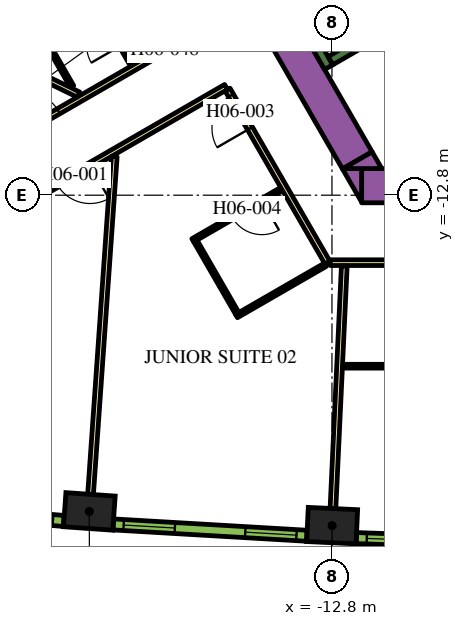
"""IFC4 building model, lengths in metres.
Left out: names, types, materials, properties, quantities, classifications, styles, units other than length and angle.
Written with IfcOpenShell. Run it as: python <this file> out.ifc"""

import sys

from ifc_helpers import new_model, si_unit, direction, frame, frame_2d, origin, origin_2d, place, context, subcontext, project, spatial, polyline, rectangle, outline, extrude, element, fill, save


model = new_model("IFC4")
c1 = context("Model", 3, precision=1e-05, world=origin(), true_north=direction((0.0, 1.0)))
c2 = subcontext(c1, "Body", "Model", "MODEL_VIEW")
j1 = project(units=[si_unit("LENGTHUNIT", "METRE"), si_unit("PLANEANGLEUNIT", "RADIAN")], contexts=[c1])
p1 = place(None, origin())
s1 = spatial("IfcSite", under=j1, at=p1, CompositionType="ELEMENT")
p2 = place(p1, origin())
s2 = spatial("IfcBuilding", under=s1, at=p2, CompositionType="ELEMENT")
p3 = place(p2, frame((0.0, 0.0, 87.6)))
s3 = spatial("IfcBuildingStorey", under=s2, at=p3, CompositionType="ELEMENT", Elevation=87.6)
for number, where, z_axis, x_axis in (
    (1, (-19.184, -21.12, 0.0), (0.0, 0.0, 1.0), (0.998, -0.07, 0.0)),
    (2, (-12.795, -21.494, 0.0), (0.0, 0.0, 1.0), (0.999, -0.047, 0.0)),
):
    element("IfcColumn", number, at=place(p3, frame(where, z_axis=z_axis, x_axis=x_axis)), inside=s3, PredefinedType="COLUMN", context=c2, shape_type="SweptSolid", body=[
        extrude(rectangle(XDim=1.3, YDim=0.9, at=origin_2d()), origin(), (0.0, 0.0, 1.0), 3.9),
    ])
p4 = place(p3, frame((-12.019, -12.55, 0.0), z_axis=(0.0, 0.0, 1.0), x_axis=(1.0, 0.0, 0.0)))
e3 = element("IfcWall", 3, at=p4, inside=s3, PredefinedType="SOLIDWALL", context=c2, shape_type="SweptSolid", body=[
    extrude(rectangle(XDim=21.63, YDim=0.9, at=frame_2d((10.815, 0.0))), origin(), (0.0, 0.0, 1.0), 3.9),
])
p5 = place(p3, origin())
e4 = element("IfcWall", 4, at=p5, inside=s3, PredefinedType="SOLIDWALL", context=c2, shape_type="SweptSolid", body=[
    extrude(outline(polyline([(-12.529, -12.1), (-12.021, -12.1), (-12.021, -12.98), (-12.529, -12.1)])), origin(), (0.0, 0.0, 1.0), 3.9),
])
p6 = place(p3, frame((-12.134, -11.883, 0.0), z_axis=(0.0, 0.0, 1.0), x_axis=(-0.500005339912, 0.866022320763, 0.0)))
e5 = element("IfcWall", 5, at=p6, inside=s3, PredefinedType="SOLIDWALL", context=c2, shape_type="SweptSolid", body=[
    extrude(rectangle(XDim=9.488, YDim=0.9, at=frame_2d((4.744, 0.0))), origin(), (0.0, 0.0, 1.0), 3.9),
])
e6 = element("IfcWall", 6, at=p5, inside=s3, PredefinedType="SOLIDWALL", context=c2, shape_type="SweptSolid", body=[
    extrude(outline(polyline([(-11.489, -12.1), (-12.505, -12.1), (-11.743, -11.66), (-11.489, -12.1)])), origin(), (0.0, 0.0, 1.0), 3.9),
])
p7 = place(p3, frame((-12.885, -9.431, 0.0), z_axis=(0.0, 0.0, 1.0), x_axis=(-0.500020560727, 0.866013532718, 0.0)))
e7 = element("IfcWall", 7, at=p7, inside=s3, PredefinedType="SOLIDWALL", context=c2, shape_type="SweptSolid", body=[
    extrude(rectangle(XDim=3.45, YDim=0.25, at=frame_2d((1.725, 0.0))), origin(), (0.0, 0.0, 1.0), 3.9),
])
p8 = place(p3, frame((-12.84, -9.261, 0.0), z_axis=(0.0, 0.0, 1.0), x_axis=(0.866016039709, 0.500016218704, 0.0)))
e8 = element("IfcWall", 8, at=p8, inside=s3, PredefinedType="SOLIDWALL", context=c2, shape_type="SweptSolid", body=[
    extrude(rectangle(XDim=7.05, YDim=0.25, at=frame_2d((3.525, 0.0))), origin(), (0.0, 0.0, 1.0), 3.9),
])
p9 = place(p3, frame((-28.211, -15.335, 0.0), z_axis=(0.0, 0.0, 1.0), x_axis=(0.866025884867, 0.49999916674, 0.0)))
e9 = element("IfcWall", 9, at=p9, inside=s3, PredefinedType="PARTITIONING", context=c2, shape_type="SweptSolid", body=[
    extrude(rectangle(XDim=13.543, YDim=0.15, at=frame_2d((6.772, 0.0))), origin(), (0.0, 0.0, 1.0), 2.75),
])
p10 = place(p9, frame((12.214, 0.0, 0.0)))
e10 = element("IfcOpeningElement", 10, at=p10, cuts=e9, PredefinedType="OPENING", context=c2, shape_type="SweptSolid", body=[
    extrude(rectangle(XDim=1.0, YDim=2.1, at=frame_2d((0.5, 1.05))), frame((0.0, 0.085, 0.0), z_axis=(0.0, -1.0, 0.0), x_axis=(1.0, 0.0, 0.0)), (0.0, 0.0, 1.0), 0.17),
])
p11 = place(p9, frame((8.488, 0.0, 0.0)))
e11 = element("IfcOpeningElement", 11, at=p11, cuts=e9, PredefinedType="OPENING", context=c2, shape_type="SweptSolid", body=[
    extrude(rectangle(XDim=1.0, YDim=2.1, at=frame_2d((0.5, 1.05))), frame((0.0, 0.085, 0.0), z_axis=(0.0, -1.0, 0.0), x_axis=(1.0, 0.0, 0.0)), (0.0, 0.0, 1.0), 0.17),
])
p12 = place(p3, frame((-15.587, -9.952, 0.0), z_axis=(0.0, 0.0, 1.0), x_axis=(-0.866017869832, -0.500013048961, 0.0)))
e12 = element("IfcWall", 12, at=p12, inside=s3, PredefinedType="PARTITIONING", context=c2, shape_type="SweptSolid", body=[
    extrude(rectangle(XDim=13.624, YDim=0.15, at=frame_2d((6.812, 0.0))), origin(), (0.0, 0.0, 1.0), 2.75),
])
p13 = place(p12, frame((4.134, 0.0, 0.0)))
e13 = element("IfcOpeningElement", 13, at=p13, cuts=e12, PredefinedType="OPENING", context=c2, shape_type="SweptSolid", body=[
    extrude(rectangle(XDim=1.0, YDim=2.1, at=frame_2d((0.5, 1.05))), frame((0.0, 0.085, 0.0), z_axis=(0.0, -1.0, 0.0), x_axis=(1.0, 0.0, 0.0)), (0.0, 0.0, 1.0), 0.17),
])
p14 = place(p3, frame((-12.918, -14.575, 0.0), z_axis=(0.0, 0.0, 1.0), x_axis=(-0.500009150678, 0.866020120573, 0.0)))
e14 = element("IfcWall", 14, at=p14, inside=s3, PredefinedType="PARTITIONING", context=c2, shape_type="SweptSolid", body=[
    extrude(rectangle(XDim=5.258, YDim=0.15, at=frame_2d((2.629, 0.0))), origin(), (0.0, 0.0, 1.0), 2.75),
])
p15 = place(p14, frame((4.078, 0.0, 0.0)))
e15 = element("IfcOpeningElement", 15, at=p15, cuts=e14, PredefinedType="OPENING", context=c2, shape_type="SweptSolid", body=[
    extrude(rectangle(XDim=1.0, YDim=2.1, at=frame_2d((0.5, 1.05))), frame((0.0, 0.085, 0.0), z_axis=(0.0, -1.0, 0.0), x_axis=(1.0, 0.0, 0.0)), (0.0, 0.0, 1.0), 0.17),
])
p16 = place(p3, frame((12.918, -14.575, 0.0), z_axis=(0.0, 0.0, 1.0), x_axis=(-1.0, 0.0, 0.0)))
e16 = element("IfcWall", 16, at=p16, inside=s3, PredefinedType="PARTITIONING", context=c2, shape_type="SweptSolid", body=[
    extrude(rectangle(XDim=25.766, YDim=0.15, at=frame_2d((12.883, 0.0))), origin(), (0.0, 0.0, 1.0), 2.75),
])
p17 = place(p16, frame((19.306, 0.0, 0.0)))
e17 = element("IfcOpeningElement", 17, at=p17, cuts=e16, PredefinedType="OPENING", context=c2, shape_type="SweptSolid", body=[
    extrude(rectangle(XDim=1.0, YDim=2.1, at=frame_2d((0.5, 1.05))), frame((0.0, 0.085, 0.0), z_axis=(0.0, -1.0, 0.0), x_axis=(1.0, 0.0, 0.0)), (0.0, 0.0, 1.0), 0.17),
])
p18 = place(p16, frame((17.999, 0.0, 0.0)))
e18 = element("IfcOpeningElement", 18, at=p18, cuts=e16, PredefinedType="OPENING", context=c2, shape_type="SweptSolid", body=[
    extrude(rectangle(XDim=1.0, YDim=2.1, at=frame_2d((0.5, 1.05))), frame((0.0, 0.085, 0.0), z_axis=(0.0, -1.0, 0.0), x_axis=(1.0, 0.0, 0.0)), (0.0, 0.0, 1.0), 0.17),
])
p19 = place(p16, frame((10.874, 0.0, 0.0)))
e19 = element("IfcOpeningElement", 19, at=p19, cuts=e16, PredefinedType="OPENING", context=c2, shape_type="SweptSolid", body=[
    extrude(rectangle(XDim=0.9, YDim=2.1, at=frame_2d((0.45, 1.05))), frame((0.0, 0.085, 0.0), z_axis=(0.0, -1.0, 0.0), x_axis=(1.0, 0.0, 0.0)), (0.0, 0.0, 1.0), 0.17),
])
p20 = place(p16, frame((8.647, 0.0, 0.0)))
e20 = element("IfcOpeningElement", 20, at=p20, cuts=e16, PredefinedType="OPENING", context=c2, shape_type="SweptSolid", body=[
    extrude(rectangle(XDim=1.0, YDim=2.1, at=frame_2d((0.5, 1.05))), frame((0.0, 0.085, 0.0), z_axis=(0.0, -1.0, 0.0), x_axis=(1.0, 0.0, 0.0)), (0.0, 0.0, 1.0), 0.17),
])
p21 = place(p16, frame((0.18, 0.0, 0.0)))
e21 = element("IfcOpeningElement", 21, at=p21, cuts=e16, PredefinedType="OPENING", context=c2, shape_type="SweptSolid", body=[
    extrude(rectangle(XDim=1.0, YDim=2.1, at=frame_2d((0.5, 1.05))), frame((0.0, 0.085, 0.0), z_axis=(0.0, -1.0, 0.0), x_axis=(1.0, 0.0, 0.0)), (0.0, 0.0, 1.0), 0.17),
])
p22 = place(p3, frame((-27.479, -6.251, 0.0), z_axis=(0.0, 0.0, 1.0), x_axis=(0.898945877276, -0.438059710231, 0.0)))
e22 = element("IfcWall", 22, at=p22, inside=s3, PredefinedType="PARTITIONING", context=c2, shape_type="SweptSolid", body=[
    extrude(rectangle(XDim=8.909, YDim=0.15, at=frame_2d((4.455, 0.0))), origin(), (0.0, 0.0, 1.0), 2.75),
])
p23 = place(p3, frame((-19.153, -20.671, 0.0), z_axis=(0.0, 0.0, 1.0), x_axis=(0.070070736723, 0.997542025107, 0.0)))
e23 = element("IfcWall", 23, at=p23, inside=s3, PredefinedType="PARTITIONING", context=c2, shape_type="SweptSolid", body=[
    extrude(rectangle(XDim=8.909, YDim=0.15, at=frame_2d((4.455, 0.0))), origin(), (0.0, 0.0, 1.0), 2.75),
])
p24 = place(p3, frame((-12.774, -21.045, 0.0), z_axis=(0.0, 0.0, 1.0), x_axis=(0.046750341626, 0.998906605023, 0.0)))
e24 = element("IfcWall", 24, at=p24, inside=s3, PredefinedType="PARTITIONING", context=c2, shape_type="SweptSolid", body=[
    extrude(rectangle(XDim=6.392, YDim=0.15, at=frame_2d((3.196, 0.0))), origin(), (0.0, 0.0, 1.0), 2.75),
])
p25 = place(p3, frame((-14.123, -12.638, 0.0), z_axis=(0.0, 0.0, 1.0), x_axis=(-0.86599734893, -0.500048589285, 0.0)))
e25 = element("IfcWall", 25, at=p25, inside=s3, PredefinedType="PARTITIONING", context=c2, shape_type="SweptSolid", body=[
    extrude(rectangle(XDim=2.7, YDim=0.1, at=frame_2d((1.35, 0.0))), origin(), (0.0, 0.0, 1.0), 2.75),
])
p26 = place(p25, frame((0.6, 0.0, 0.0)))
e26 = element("IfcOpeningElement", 26, at=p26, cuts=e25, PredefinedType="OPENING", context=c2, shape_type="SweptSolid", body=[
    extrude(rectangle(XDim=0.9, YDim=2.1, at=frame_2d((0.45, 1.05))), frame((0.0, 0.06, 0.0), z_axis=(0.0, -1.0, 0.0), x_axis=(1.0, 0.0, 0.0)), (0.0, 0.0, 1.0), 0.12),
])
p27 = place(p3, frame((-16.393, -14.006, 0.0), z_axis=(0.0, 0.0, 1.0), x_axis=(0.499946605688, -0.86605622881, 0.0)))
e27 = element("IfcWall", 27, at=p27, inside=s3, PredefinedType="PARTITIONING", context=c2, shape_type="SweptSolid", body=[
    extrude(rectangle(XDim=2.2, YDim=0.1, at=frame_2d((1.1, 0.0))), origin(), (0.0, 0.0, 1.0), 2.75),
])
p28 = place(p3, frame((-12.973, -14.63, 0.0), z_axis=(0.0, 0.0, 1.0), x_axis=(-0.866036505625, -0.499980770555, 0.0)))
e28 = element("IfcWall", 28, at=p28, inside=s3, PredefinedType="PARTITIONING", context=c2, shape_type="SweptSolid", body=[
    extrude(rectangle(XDim=2.7, YDim=0.1, at=frame_2d((1.35, 0.0))), origin(), (0.0, 0.0, 1.0), 2.75),
])
p29 = place(p3, frame((-10.272, -17.3, 0.0), z_axis=(0.0, 0.0, 1.0), x_axis=(-1.0, 0.0, 0.0)))
e29 = element("IfcWall", 29, at=p29, inside=s3, PredefinedType="PARTITIONING", context=c2, shape_type="SweptSolid", body=[
    extrude(rectangle(XDim=2.25, YDim=0.1, at=frame_2d((1.125, 0.0))), origin(), (0.0, 0.0, 1.0), 2.75),
])
p30 = place(p3, frame((-18.055, -9.385, 0.0), z_axis=(0.0, 0.0, 1.0), x_axis=(-0.499939757307, 0.866060182126, 0.0)))
e30 = element("IfcWall", 30, at=p30, inside=s3, PredefinedType="PARTITIONING", context=c2, shape_type="SweptSolid", body=[
    extrude(rectangle(XDim=2.95, YDim=0.1, at=frame_2d((1.475, 0.0))), origin(), (0.0, 0.0, 1.0), 2.75),
])
p31 = place(p30, frame((0.6, 0.0, 0.0)))
e31 = element("IfcOpeningElement", 31, at=p31, cuts=e30, PredefinedType="OPENING", context=c2, shape_type="SweptSolid", body=[
    extrude(rectangle(XDim=0.9, YDim=2.1, at=frame_2d((0.45, 1.05))), frame((0.0, 0.06, 0.0), z_axis=(0.0, -1.0, 0.0), x_axis=(1.0, 0.0, 0.0)), (0.0, 0.0, 1.0), 0.12),
])
p32 = place(p3, frame((-19.639, -9.941, 0.0), z_axis=(0.0, 0.0, 1.0), x_axis=(-0.499938597367, 0.866060851709, 0.0)))
e32 = element("IfcWall", 32, at=p32, inside=s3, PredefinedType="PARTITIONING", context=c2, shape_type="SweptSolid", body=[
    extrude(rectangle(XDim=2.64, YDim=0.1, at=frame_2d((1.32, 0.0))), origin(), (0.0, 0.0, 1.0), 2.75),
])
p33 = place(p3, frame((-24.946, -20.954, 0.0), z_axis=(0.0, 0.0, 1.0), x_axis=(0.99665273362, -0.081751627308, 0.0)))
e33 = element("IfcWall", 33, at=p33, inside=s3, PredefinedType="SOLIDWALL", context=c2, shape_type="SweptSolid", body=[
    extrude(rectangle(XDim=5.107, YDim=0.29, at=frame_2d((2.553, 0.0))), origin(), (0.0, 0.0, 1.0), 3.65),
])
p34 = place(p33, frame((0.24, 0.0, 0.9)))
e34 = element("IfcOpeningElement", 34, at=p34, cuts=e33, PredefinedType="OPENING", context=c2, shape_type="SweptSolid", body=[
    extrude(rectangle(XDim=1.35, YDim=2.15, at=frame_2d((0.675, 1.075))), frame((0.0, 0.155, 0.0), z_axis=(0.0, -1.0, 0.0), x_axis=(1.0, 0.0, 0.0)), (0.0, 0.0, 1.0), 0.31),
])
p35 = place(p33, frame((3.471, 0.0, 0.9)))
e35 = element("IfcOpeningElement", 35, at=p35, cuts=e33, PredefinedType="OPENING", context=c2, shape_type="SweptSolid", body=[
    extrude(rectangle(XDim=1.35, YDim=2.15, at=frame_2d((0.675, 1.075))), frame((0.0, 0.155, 0.0), z_axis=(0.0, -1.0, 0.0), x_axis=(1.0, 0.0, 0.0)), (0.0, 0.0, 1.0), 0.31),
])
p36 = place(p3, frame((-18.553, -21.463, 0.0), z_axis=(0.0, 0.0, 1.0), x_axis=(0.998290511436, -0.058447025388, 0.0)))
e36 = element("IfcWall", 36, at=p36, inside=s3, PredefinedType="SOLIDWALL", context=c2, shape_type="SweptSolid", body=[
    extrude(rectangle(XDim=5.1, YDim=0.29, at=frame_2d((2.55, 0.0))), origin(), (0.0, 0.0, 1.0), 3.65),
])
p37 = place(p36, frame((0.273, 0.0, 0.9)))
e37 = element("IfcOpeningElement", 37, at=p37, cuts=e36, PredefinedType="OPENING", context=c2, shape_type="SweptSolid", body=[
    extrude(rectangle(XDim=1.35, YDim=2.15, at=frame_2d((0.675, 1.075))), frame((0.0, 0.155, 0.0), z_axis=(0.0, -1.0, 0.0), x_axis=(1.0, 0.0, 0.0)), (0.0, 0.0, 1.0), 0.31),
])
p38 = place(p36, frame((3.478, 0.0, 0.9)))
e38 = element("IfcOpeningElement", 38, at=p38, cuts=e36, PredefinedType="OPENING", context=c2, shape_type="SweptSolid", body=[
    extrude(rectangle(XDim=1.35, YDim=2.15, at=frame_2d((0.675, 1.075))), frame((0.0, 0.155, 0.0), z_axis=(0.0, -1.0, 0.0), x_axis=(1.0, 0.0, 0.0)), (0.0, 0.0, 1.0), 0.31),
])
p39 = place(p3, frame((-12.157, -21.822, 0.0), z_axis=(0.0, 0.0, 1.0), x_axis=(0.999385993957, -0.035037623812, 0.0)))
e39 = element("IfcWall", 39, at=p39, inside=s3, PredefinedType="SOLIDWALL", context=c2, shape_type="SweptSolid", body=[
    extrude(rectangle(XDim=5.101, YDim=0.29, at=frame_2d((2.55, 0.0))), origin(), (0.0, 0.0, 1.0), 3.65),
])
p40 = place(p39, frame((0.273, 0.0, 0.9)))
e40 = element("IfcOpeningElement", 40, at=p40, cuts=e39, PredefinedType="OPENING", context=c2, shape_type="SweptSolid", body=[
    extrude(rectangle(XDim=1.35, YDim=2.15, at=frame_2d((0.675, 1.075))), frame((0.0, 0.155, 0.0), z_axis=(0.0, -1.0, 0.0), x_axis=(1.0, 0.0, 0.0)), (0.0, 0.0, 1.0), 0.31),
])
p41 = place(p39, frame((3.478, 0.0, 0.9)))
e41 = element("IfcOpeningElement", 41, at=p41, cuts=e39, PredefinedType="OPENING", context=c2, shape_type="SweptSolid", body=[
    extrude(rectangle(XDim=1.35, YDim=2.15, at=frame_2d((0.675, 1.075))), frame((0.0, 0.155, 0.0), z_axis=(0.0, -1.0, 0.0), x_axis=(1.0, 0.0, 0.0)), (0.0, 0.0, 1.0), 0.31),
])
p42 = place(p13, origin())
e42 = element("IfcDoor", 42, at=p42, inside=s3, OperationType="SINGLE_SWING_LEFT", PredefinedType="DOOR", context=c2, shape_type="SweptSolid", body=[
    extrude(rectangle(XDim=1.0, YDim=2.1, at=frame_2d((0.5, 1.05))), frame((0.0, 0.025, 0.0), z_axis=(0.0, -1.0, 0.0), x_axis=(1.0, 0.0, 0.0)), (0.0, 0.0, 1.0), 0.05),
])
fill(e13, e42)
p43 = place(p15, origin())
e43 = element("IfcDoor", 43, at=p43, inside=s3, OperationType="SINGLE_SWING_RIGHT", PredefinedType="DOOR", context=c2, shape_type="SweptSolid", body=[
    extrude(rectangle(XDim=1.0, YDim=2.1, at=frame_2d((0.5, 1.05))), frame((0.0, 0.025, 0.0), z_axis=(0.0, -1.0, 0.0), x_axis=(1.0, 0.0, 0.0)), (0.0, 0.0, 1.0), 0.05),
])
fill(e15, e43)
p44 = place(p26, origin())
e44 = element("IfcDoor", 44, at=p44, inside=s3, OperationType="SINGLE_SWING_LEFT", PredefinedType="DOOR", context=c2, shape_type="SweptSolid", body=[
    extrude(rectangle(XDim=0.9, YDim=2.1, at=frame_2d((0.45, 1.05))), frame((0.0, 0.025, 0.0), z_axis=(0.0, -1.0, 0.0), x_axis=(1.0, 0.0, 0.0)), (0.0, 0.0, 1.0), 0.05),
])
fill(e26, e44)
p45 = place(p10, origin())
e45 = element("IfcDoor", 45, at=p45, inside=s3, OperationType="SINGLE_SWING_RIGHT", PredefinedType="DOOR", context=c2, shape_type="SweptSolid", body=[
    extrude(rectangle(XDim=1.0, YDim=2.1, at=frame_2d((0.5, 1.05))), frame((0.0, 0.025, 0.0), z_axis=(0.0, -1.0, 0.0), x_axis=(1.0, 0.0, 0.0)), (0.0, 0.0, 1.0), 0.05),
])
fill(e10, e45)
p46 = place(p11, origin())
e46 = element("IfcDoor", 46, at=p46, inside=s3, OperationType="SINGLE_SWING_RIGHT", PredefinedType="DOOR", context=c2, shape_type="SweptSolid", body=[
    extrude(rectangle(XDim=1.0, YDim=2.1, at=frame_2d((0.5, 1.05))), frame((0.0, 0.025, 0.0), z_axis=(0.0, -1.0, 0.0), x_axis=(1.0, 0.0, 0.0)), (0.0, 0.0, 1.0), 0.05),
])
fill(e11, e46)
p47 = place(p35, origin())
e47 = element("IfcWindow", 47, at=p47, inside=s3, PartitioningType="DOUBLE_PANEL_VERTICAL", PredefinedType="WINDOW", context=c2, shape_type="SweptSolid", body=[
    extrude(rectangle(XDim=1.35, YDim=2.15, at=frame_2d((0.675, 1.075))), frame((0.0, 0.015, 0.0), z_axis=(0.0, -1.0, 0.0), x_axis=(1.0, 0.0, 0.0)), (0.0, 0.0, 1.0), 0.06),
])
fill(e35, e47)
p48 = place(p37, origin())
e48 = element("IfcWindow", 48, at=p48, inside=s3, PartitioningType="DOUBLE_PANEL_VERTICAL", PredefinedType="WINDOW", context=c2, shape_type="SweptSolid", body=[
    extrude(rectangle(XDim=1.35, YDim=2.15, at=frame_2d((0.675, 1.075))), frame((0.0, 0.015, 0.0), z_axis=(0.0, -1.0, 0.0), x_axis=(1.0, 0.0, 0.0)), (0.0, 0.0, 1.0), 0.06),
])
fill(e37, e48)
p49 = place(p38, origin())
e49 = element("IfcWindow", 49, at=p49, inside=s3, PartitioningType="DOUBLE_PANEL_VERTICAL", PredefinedType="WINDOW", context=c2, shape_type="SweptSolid", body=[
    extrude(rectangle(XDim=1.35, YDim=2.15, at=frame_2d((0.675, 1.075))), frame((0.0, 0.015, 0.0), z_axis=(0.0, -1.0, 0.0), x_axis=(1.0, 0.0, 0.0)), (0.0, 0.0, 1.0), 0.06),
])
fill(e38, e49)
p50 = place(p40, origin())
e50 = element("IfcWindow", 50, at=p50, inside=s3, PartitioningType="DOUBLE_PANEL_VERTICAL", PredefinedType="WINDOW", context=c2, shape_type="SweptSolid", body=[
    extrude(rectangle(XDim=1.35, YDim=2.15, at=frame_2d((0.675, 1.075))), frame((0.0, 0.015, 0.0), z_axis=(0.0, -1.0, 0.0), x_axis=(1.0, 0.0, 0.0)), (0.0, 0.0, 1.0), 0.06),
])
fill(e40, e50)
save(model, sys.argv[1])
